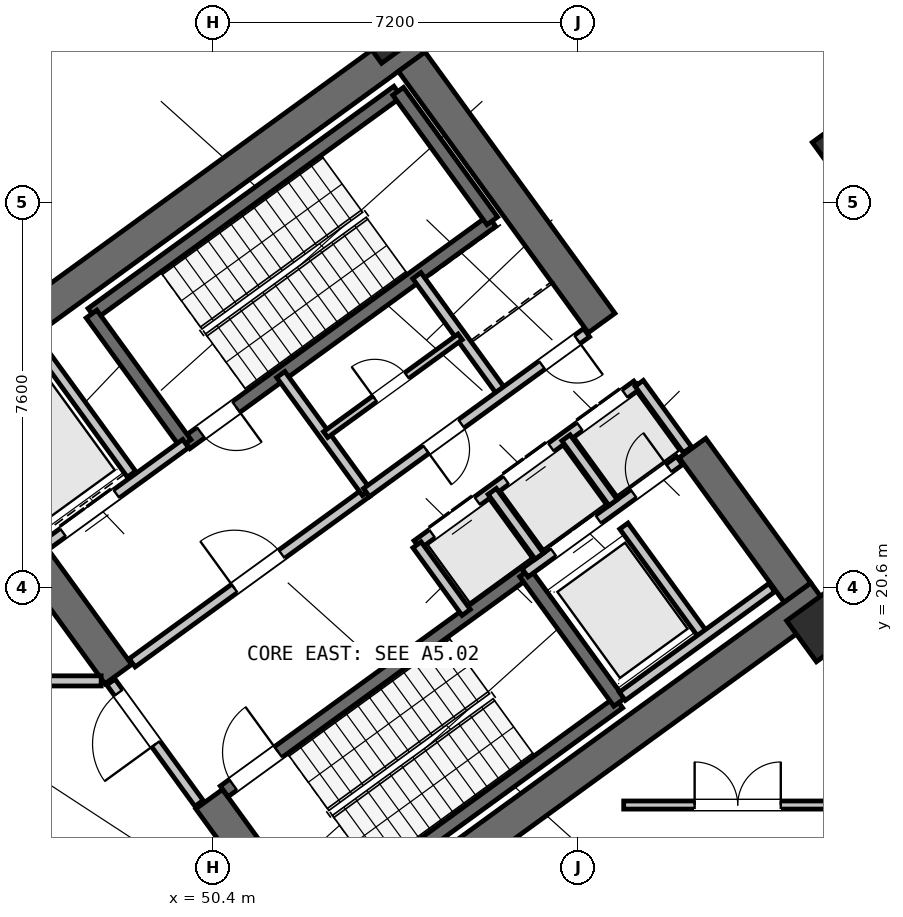
"""IFC4 building model, lengths in metres.
Left out: names, types, materials, properties, quantities, classifications, styles, units other than length and angle.
Written with IfcOpenShell. Run it as: python <this file> out.ifc"""

import sys

from ifc_helpers import new_model, si_unit, direction, frame, frame_2d, origin, origin_2d, place, context, subcontext, project, spatial, rectangle, hollow_rectangle, extrude, source, transform, mapped, element, fill, save


model = new_model("IFC4")
c1 = context("Model", 3, precision=1e-05, world=origin(), true_north=direction((0.0, 1.0)))
c2 = subcontext(c1, "Body", "Model", "MODEL_VIEW")
j1 = project(units=[si_unit("LENGTHUNIT", "METRE"), si_unit("PLANEANGLEUNIT", "RADIAN")], contexts=[c1])
p1 = place(None, origin())
s1 = spatial("IfcSite", under=j1, at=p1, CompositionType="ELEMENT")
p2 = place(p1, origin())
s2 = spatial("IfcBuilding", under=s1, at=p2, CompositionType="ELEMENT")
p3 = place(p2, origin())
s3 = spatial("IfcBuildingStorey", under=s2, at=p3, CompositionType="ELEMENT", Elevation=0.0)
p4 = place(p3, frame((52.318, 13.11, 0.0), z_axis=(0.0, 0.0, 1.0), x_axis=(0.809019445368, 0.587781878776, 0.0)))
e1 = element("IfcWall", 1, at=p4, inside=s3, PredefinedType="SHEAR", context=c2, shape_type="SweptSolid", body=[
    extrude(rectangle(XDim=12.44, YDim=0.65, at=frame_2d((6.22, 0.0))), origin(), (0.0, 0.0, 1.0), 5.05),
])
p5 = place(p3, frame((44.325, 24.113, 0.0), z_axis=(0.0, 0.0, 1.0), x_axis=(0.809012664862, 0.58779121131, 0.0)))
e2 = element("IfcWall", 2, at=p5, inside=s3, PredefinedType="SHEAR", context=c2, shape_type="SweptSolid", body=[
    extrude(rectangle(XDim=12.44, YDim=0.65, at=frame_2d((6.22, 0.0))), origin(), (0.0, 0.0, 1.0), 5.05),
])
p6 = place(p3, frame((52.39, 13.564, 0.0), z_axis=(0.0, 0.0, 1.0), x_axis=(-0.58779688989, 0.809008539037, 0.0)))
e3 = element("IfcWall", 3, at=p6, inside=s3, PredefinedType="SHEAR", context=c2, shape_type="SweptSolid", body=[
    extrude(rectangle(XDim=3.525, YDim=0.65, at=frame_2d((1.763, 0.0))), origin(), (0.0, 0.0, 1.0), 5.05),
])
p7 = place(p3, frame((48.526, 18.884, 0.0), z_axis=(0.0, 0.0, 1.0), x_axis=(-0.58777996584, 0.809020835181, 0.0)))
e4 = element("IfcWall", 4, at=p7, inside=s3, PredefinedType="SHEAR", context=c2, shape_type="SweptSolid", body=[
    extrude(rectangle(XDim=6.375, YDim=0.65, at=frame_2d((3.188, 0.0))), origin(), (0.0, 0.0, 1.0), 5.05),
])
p8 = place(p3, frame((61.929, 20.494, 0.0), z_axis=(0.0, 0.0, 1.0), x_axis=(-0.58782982593, 0.808984607855, 0.0)))
e5 = element("IfcWall", 5, at=p8, inside=s3, PredefinedType="SHEAR", context=c2, shape_type="SweptSolid", body=[
    extrude(rectangle(XDim=3.525, YDim=0.65, at=frame_2d((1.762, 0.0))), origin(), (0.0, 0.0, 1.0), 5.05),
])
p9 = place(p3, frame((58.064, 25.813, 0.0), z_axis=(0.0, 0.0, 1.0), x_axis=(-0.58777996584, 0.809020835181, 0.0)))
e6 = element("IfcWall", 6, at=p9, inside=s3, PredefinedType="SHEAR", context=c2, shape_type="SweptSolid", body=[
    extrude(rectangle(XDim=6.375, YDim=0.65, at=frame_2d((3.188, 0.0))), origin(), (0.0, 0.0, 1.0), 5.05),
])
m1 = source(origin(), c2, "Body", "SweptSolid", [
    extrude(hollow_rectangle(XDim=1.08, YDim=1.08, WallThickness=0.04, at=origin_2d()), origin(), (0.0, 0.0, 1.0), 5.4),
])
p10 = place(p3, frame((62.977, 29.259, 0.0), z_axis=(0.0, 0.0, 1.0), x_axis=(0.809016994375, 0.587785252292, 0.0)))
e7 = element("IfcColumn", 7, at=p10, inside=s3, PredefinedType="COLUMN", context=c2, shape_type="MappedRepresentation", body=[
    mapped(m1, transform((0.0, 0.0, 0.0), scale=1.0)),
])
m2 = source(origin(), c2, "Body", "SweptSolid", [
    extrude(hollow_rectangle(XDim=1.0, YDim=1.0, WallThickness=0.04, at=origin_2d()), origin(), (0.0, 0.0, 1.0), 5.4),
])
for number, where, z_axis, x_axis in (
    (8, (62.414, 19.827, 0.0), (0.0, 0.0, 1.0), (0.809, 0.588, 0.0)),
    (9, (53.832, 31.638, 0.0), (0.0, 0.0, 1.0), (0.809, 0.588, 0.0)),
):
    element("IfcColumn", number, at=place(p3, frame(where, z_axis=z_axis, x_axis=x_axis)), inside=s3, PredefinedType="COLUMN", context=c2, shape_type="MappedRepresentation", body=[
        mapped(m2, transform((0.0, 0.0, 0.0), scale=1.0)),
    ])
p11 = place(p3, frame((48.006, 25.996, 0.0), z_axis=(0.0, 0.0, 1.0), x_axis=(0.80901903764, 0.587782439969, 0.0)))
e10 = element("IfcWall", 10, at=p11, inside=s3, PredefinedType="SHEAR", context=c2, shape_type="SweptSolid", body=[
    extrude(rectangle(XDim=7.46, YDim=0.26, at=frame_2d((3.73, 0.0))), origin(), (0.0, 0.0, 1.0), 5.05),
])
p12 = place(p3, frame((49.863, 23.44, 0.0), z_axis=(0.0, 0.0, 1.0), x_axis=(0.809003474932, 0.587803859759, 0.0)))
e11 = element("IfcWall", 11, at=p12, inside=s3, PredefinedType="SHEAR", context=c2, shape_type="SweptSolid", body=[
    extrude(rectangle(XDim=7.46, YDim=0.26, at=frame_2d((3.73, 0.0))), origin(), (0.0, 0.0, 1.0), 5.05),
])
p13 = place(p12, frame((0.36, 0.0, 0.0)))
e12 = element("IfcOpeningElement", 12, at=p13, cuts=e11, PredefinedType="OPENING", context=c2, shape_type="SweptSolid", body=[
    extrude(rectangle(XDim=0.86, YDim=2.05, at=frame_2d((0.43, 1.025))), frame((0.0, 0.14, 0.0), z_axis=(0.0, -1.0, 0.0), x_axis=(1.0, 0.0, 0.0)), (0.0, 0.0, 1.0), 0.28),
])
p14 = place(p3, frame((49.855, 23.434, 0.0), z_axis=(0.0, 0.0, 1.0), x_axis=(-0.58776738483, 0.809029975545, 0.0)))
e13 = element("IfcWall", 13, at=p14, inside=s3, PredefinedType="SHEAR", context=c2, shape_type="SweptSolid", body=[
    extrude(rectangle(XDim=3.16, YDim=0.26, at=frame_2d((1.58, 0.0))), origin(), (0.0, 0.0, 1.0), 5.05),
])
p15 = place(p3, frame((55.906, 27.831, 0.0), z_axis=(0.0, 0.0, 1.0), x_axis=(-0.587804123638, 0.809003283204, 0.0)))
e14 = element("IfcWall", 14, at=p15, inside=s3, PredefinedType="SHEAR", context=c2, shape_type="SweptSolid", body=[
    extrude(rectangle(XDim=3.16, YDim=0.26, at=frame_2d((1.58, 0.0))), origin(), (0.0, 0.0, 1.0), 5.05),
])
p16 = place(p3, frame((52.472, 14.013, 0.0), z_axis=(0.0, 0.0, 1.0), x_axis=(0.809028366311, 0.587769599847, 0.0)))
e15 = element("IfcWall", 15, at=p16, inside=s3, PredefinedType="SHEAR", context=c2, shape_type="SweptSolid", body=[
    extrude(rectangle(XDim=7.33, YDim=0.26, at=frame_2d((3.665, 0.0))), origin(), (0.0, 0.0, 1.0), 5.05),
])
p17 = place(p3, frame((50.615, 16.57, 0.0), z_axis=(0.0, 0.0, 1.0), x_axis=(0.809028366311, 0.587769599847, 0.0)))
e16 = element("IfcWall", 16, at=p17, inside=s3, PredefinedType="SHEAR", context=c2, shape_type="SweptSolid", body=[
    extrude(rectangle(XDim=7.33, YDim=0.26, at=frame_2d((3.665, 0.0))), origin(), (0.0, 0.0, 1.0), 5.05),
])
p18 = place(p17, frame((0.22, 0.0, 0.0)))
e17 = element("IfcOpeningElement", 17, at=p18, cuts=e16, PredefinedType="OPENING", context=c2, shape_type="SweptSolid", body=[
    extrude(rectangle(XDim=1.1, YDim=2.1, at=frame_2d((0.55, 1.05))), frame((0.0, 0.14, 0.0), z_axis=(0.0, -1.0, 0.0), x_axis=(1.0, 0.0, 0.0)), (0.0, 0.0, 1.0), 0.28),
])
p19 = place(p3, frame((58.41, 18.327, 0.0), z_axis=(0.0, 0.0, 1.0), x_axis=(-0.58776738483, 0.809029975545, 0.0)))
e18 = element("IfcWall", 18, at=p19, inside=s3, PredefinedType="SHEAR", context=c2, shape_type="SweptSolid", body=[
    extrude(rectangle(XDim=3.16, YDim=0.26, at=frame_2d((1.58, 0.0))), origin(), (0.0, 0.0, 1.0), 5.05),
])
p20 = place(p3, frame((47.106, 21.437, 0.0), z_axis=(0.0, 0.0, 1.0), x_axis=(0.809012514015, 0.58779141893, 0.0)))
e19 = element("IfcWall", 19, at=p20, inside=s3, PredefinedType="STANDARD", context=c2, shape_type="SweptSolid", body=[
    extrude(rectangle(XDim=3.398, YDim=0.2, at=frame_2d((1.699, 0.0))), origin(), (0.0, 0.0, 1.0), 5.04),
])
p21 = place(p20, frame((0.408, 0.0, 0.0)))
e20 = element("IfcOpeningElement", 20, at=p21, cuts=e19, PredefinedType="OPENING", context=c2, shape_type="SweptSolid", body=[
    extrude(rectangle(XDim=1.3, YDim=2.2, at=frame_2d((0.65, 1.1))), frame((0.0, 0.11, 0.0), z_axis=(0.0, -1.0, 0.0), x_axis=(1.0, 0.0, 0.0)), (0.0, 0.0, 1.0), 0.22),
])
p22 = place(p3, frame((48.799, 19.107, 0.0), z_axis=(0.0, 0.0, 1.0), x_axis=(0.809012959416, 0.587790805897, 0.0)))
e21 = element("IfcWall", 21, at=p22, inside=s3, PredefinedType="STANDARD", context=c2, shape_type="SweptSolid", body=[
    extrude(rectangle(XDim=5.718, YDim=0.2, at=frame_2d((2.859, 0.0))), origin(), (0.0, 0.0, 1.0), 5.04),
])
p23 = place(p22, frame((2.498, 0.0, 0.0)))
e22 = element("IfcOpeningElement", 22, at=p23, cuts=e21, PredefinedType="OPENING", context=c2, shape_type="SweptSolid", body=[
    extrude(rectangle(XDim=1.15, YDim=2.1, at=frame_2d((0.575, 1.05))), frame((0.0, 0.11, 0.0), z_axis=(0.0, -1.0, 0.0), x_axis=(1.0, 0.0, 0.0)), (0.0, 0.0, 1.0), 0.22),
])
p24 = place(p3, frame((56.553, 20.884, 0.0), z_axis=(0.0, 0.0, 1.0), x_axis=(0.809035789462, 0.587759382205, 0.0)))
e23 = element("IfcWall", 23, at=p24, inside=s3, PredefinedType="STANDARD", context=c2, shape_type="SweptSolid", body=[
    extrude(rectangle(XDim=3.768, YDim=0.2, at=frame_2d((1.884, 0.0))), origin(), (0.0, 0.0, 1.0), 5.04),
])
p25 = place(p24, frame((0.69, 0.0, 0.0)))
e24 = element("IfcOpeningElement", 24, at=p25, cuts=e23, PredefinedType="OPENING", context=c2, shape_type="SweptSolid", body=[
    extrude(rectangle(XDim=1.1, YDim=2.15, at=frame_2d((0.55, 1.075))), frame((0.0, 0.11, 0.0), z_axis=(0.0, -1.0, 0.0), x_axis=(1.0, 0.0, 0.0)), (0.0, 0.0, 1.0), 0.22),
])
p26 = place(p24, frame((2.65, 0.0, 0.0)))
e25 = element("IfcOpeningElement", 25, at=p26, cuts=e23, PredefinedType="OPENING", context=c2, shape_type="SweptSolid", body=[
    extrude(rectangle(XDim=0.86, YDim=2.05, at=frame_2d((0.43, 1.025))), frame((0.0, 0.11, 0.0), z_axis=(0.0, -1.0, 0.0), x_axis=(1.0, 0.0, 0.0)), (0.0, 0.0, 1.0), 0.22),
])
p27 = place(p3, frame((54.421, 21.436, 0.0), z_axis=(0.0, 0.0, 1.0), x_axis=(0.809013710463, 0.587789772183, 0.0)))
e26 = element("IfcWall", 26, at=p27, inside=s3, PredefinedType="STANDARD", context=c2, shape_type="SweptSolid", body=[
    extrude(rectangle(XDim=5.36, YDim=0.2, at=frame_2d((2.68, 0.0))), origin(), (0.0, 0.0, 1.0), 5.04),
])
p28 = place(p27, frame((0.37, 0.0, 0.0)))
e27 = element("IfcOpeningElement", 27, at=p28, cuts=e26, PredefinedType="OPENING", context=c2, shape_type="SweptSolid", body=[
    extrude(rectangle(XDim=1.1, YDim=2.15, at=frame_2d((0.55, 1.075))), frame((0.0, 0.11, 0.0), z_axis=(0.0, -1.0, 0.0), x_axis=(1.0, 0.0, 0.0)), (0.0, 0.0, 1.0), 0.22),
])
p29 = place(p27, frame((2.17, 0.0, 0.0)))
e28 = element("IfcOpeningElement", 28, at=p29, cuts=e26, PredefinedType="OPENING", context=c2, shape_type="SweptSolid", body=[
    extrude(rectangle(XDim=1.1, YDim=2.15, at=frame_2d((0.55, 1.075))), frame((0.0, 0.11, 0.0), z_axis=(0.0, -1.0, 0.0), x_axis=(1.0, 0.0, 0.0)), (0.0, 0.0, 1.0), 0.22),
])
p30 = place(p27, frame((3.97, 0.0, 0.0)))
e29 = element("IfcOpeningElement", 29, at=p30, cuts=e26, PredefinedType="OPENING", context=c2, shape_type="SweptSolid", body=[
    extrude(rectangle(XDim=1.1, YDim=2.15, at=frame_2d((0.55, 1.075))), frame((0.0, 0.11, 0.0), z_axis=(0.0, -1.0, 0.0), x_axis=(1.0, 0.0, 0.0)), (0.0, 0.0, 1.0), 0.22),
])
p31 = place(p3, frame((55.391, 20.102, 0.0), z_axis=(0.0, 0.0, 1.0), x_axis=(-0.58778447739, 0.809017557374, 0.0)))
e30 = element("IfcWall", 30, at=p31, inside=s3, PredefinedType="STANDARD", context=c2, shape_type="SweptSolid", body=[
    extrude(rectangle(XDim=1.65, YDim=0.2, at=frame_2d((0.825, 0.0))), origin(), (0.0, 0.0, 1.0), 5.04),
])
p32 = place(p3, frame((48.786, 22.83, 0.0), z_axis=(0.0, 0.0, 1.0), x_axis=(-0.587783856777, 0.809018008275, 0.0)))
e31 = element("IfcWall", 31, at=p32, inside=s3, PredefinedType="STANDARD", context=c2, shape_type="SweptSolid", body=[
    extrude(rectangle(XDim=2.92, YDim=0.2, at=frame_2d((1.46, 0.0))), origin(), (0.0, 0.0, 1.0), 5.04),
])
p33 = place(p3, frame((56.834, 21.212, 0.0), z_axis=(0.0, 0.0, 1.0), x_axis=(-0.58776738483, 0.809029975545, 0.0)))
e32 = element("IfcWall", 32, at=p33, inside=s3, PredefinedType="STANDARD", context=c2, shape_type="SweptSolid", body=[
    extrude(rectangle(XDim=1.58, YDim=0.2, at=frame_2d((0.79, 0.0))), origin(), (0.0, 0.0, 1.0), 5.04),
])
p34 = place(p3, frame((58.29, 22.27, 0.0), z_axis=(0.0, 0.0, 1.0), x_axis=(-0.587840865826, 0.808976585857, 0.0)))
e33 = element("IfcWall", 33, at=p34, inside=s3, PredefinedType="STANDARD", context=c2, shape_type="SweptSolid", body=[
    extrude(rectangle(XDim=1.58, YDim=0.2, at=frame_2d((0.79, 0.0))), origin(), (0.0, 0.0, 1.0), 5.04),
])
p35 = place(p3, frame((59.758, 23.312, 0.0), z_axis=(0.0, 0.0, 1.0), x_axis=(-0.587875962906, 0.808951081486, 0.0)))
e34 = element("IfcWall", 34, at=p35, inside=s3, PredefinedType="STANDARD", context=c2, shape_type="SweptSolid", body=[
    extrude(rectangle(XDim=1.62, YDim=0.2, at=frame_2d((0.81, 0.0))), origin(), (0.0, 0.0, 1.0), 5.04),
])
p36 = place(p3, frame((60.067, 19.655, 0.0), z_axis=(0.0, 0.0, 1.0), x_axis=(-0.587800520745, 0.809005900975, 0.0)))
e35 = element("IfcWall", 35, at=p36, inside=s3, PredefinedType="STANDARD", context=c2, shape_type="SweptSolid", body=[
    extrude(rectangle(XDim=2.66, YDim=0.2, at=frame_2d((1.33, 0.0))), origin(), (0.0, 0.0, 1.0), 5.04),
])
p37 = place(p3, frame((58.472, 18.447, 0.0), z_axis=(0.0, 0.0, 1.0), x_axis=(0.809022487728, 0.587777691266, 0.0)))
e36 = element("IfcWall", 36, at=p37, inside=s3, PredefinedType="STANDARD", context=c2, shape_type="SweptSolid", body=[
    extrude(rectangle(XDim=3.648, YDim=0.2, at=frame_2d((1.824, 0.0))), origin(), (0.0, 0.0, 1.0), 5.04),
])
p38 = place(p3, frame((53.425, 22.468, 0.0), z_axis=(0.0, 0.0, 1.0), x_axis=(-0.5877230039, 0.809062216821, 0.0)))
e37 = element("IfcWall", 37, at=p38, inside=s3, PredefinedType="STANDARD", context=c2, shape_type="SweptSolid", body=[
    extrude(rectangle(XDim=2.88, YDim=0.2, at=frame_2d((1.44, 0.0))), origin(), (0.0, 0.0, 1.0), 5.04),
])
p39 = place(p3, frame((56.111, 24.419, 0.0), z_axis=(0.0, 0.0, 1.0), x_axis=(-0.58777848983, 0.809021907548, 0.0)))
e38 = element("IfcWall", 38, at=p39, inside=s3, PredefinedType="STANDARD", context=c2, shape_type="SweptSolid", body=[
    extrude(rectangle(XDim=2.88, YDim=0.2, at=frame_2d((1.44, 0.0))), origin(), (0.0, 0.0, 1.0), 5.04),
])
p40 = place(p3, frame((53.425, 22.468, 0.0), z_axis=(0.0, 0.0, 1.0), x_axis=(0.80902705128, 0.587771409902, 0.0)))
e39 = element("IfcWall", 39, at=p40, inside=s3, PredefinedType="STANDARD", context=c2, shape_type="SweptSolid", body=[
    extrude(rectangle(XDim=5.368, YDim=0.2, at=frame_2d((2.684, 0.0))), origin(), (0.0, 0.0, 1.0), 5.04),
])
p41 = place(p40, frame((4.28, 0.0, 0.0)))
e40 = element("IfcOpeningElement", 40, at=p41, cuts=e39, PredefinedType="OPENING", context=c2, shape_type="SweptSolid", body=[
    extrude(rectangle(XDim=0.86, YDim=2.05, at=frame_2d((0.43, 1.025))), frame((0.0, 0.11, 0.0), z_axis=(0.0, -1.0, 0.0), x_axis=(1.0, 0.0, 0.0)), (0.0, 0.0, 1.0), 0.22),
])
p42 = place(p40, frame((1.45, 0.0, 0.0)))
e41 = element("IfcOpeningElement", 41, at=p42, cuts=e39, PredefinedType="OPENING", context=c2, shape_type="SweptSolid", body=[
    extrude(rectangle(XDim=0.86, YDim=2.05, at=frame_2d((0.43, 1.025))), frame((0.0, 0.11, 0.0), z_axis=(0.0, -1.0, 0.0), x_axis=(1.0, 0.0, 0.0)), (0.0, 0.0, 1.0), 0.22),
])
p43 = place(p3, frame((52.618, 23.612, 0.0), z_axis=(0.0, 0.0, 1.0), x_axis=(0.809009587469, 0.587795446889, 0.0)))
e42 = element("IfcWall", 42, at=p43, inside=s3, PredefinedType="PLUMBINGWALL", context=c2, shape_type="SweptSolid", body=[
    extrude(rectangle(XDim=3.28, YDim=0.14, at=frame_2d((1.64, 0.0))), origin(), (0.0, 0.0, 1.0), 5.04),
])
p44 = place(p43, frame((1.2, 0.0, 0.0)))
e43 = element("IfcOpeningElement", 43, at=p44, cuts=e42, PredefinedType="OPENING", context=c2, shape_type="SweptSolid", body=[
    extrude(rectangle(XDim=0.78, YDim=2.05, at=frame_2d((0.39, 1.025))), frame((0.0, 0.08, 0.0), z_axis=(0.0, -1.0, 0.0), x_axis=(1.0, 0.0, 0.0)), (0.0, 0.0, 1.0), 0.16),
])
p45 = place(p3, frame((46.85, 18.75, 0.0), z_axis=(0.0, 0.0, 1.0), x_axis=(1.0, 0.0, 0.0)))
e44 = element("IfcWall", 44, at=p45, inside=s3, PredefinedType="STANDARD", context=c2, shape_type="SweptSolid", body=[
    extrude(rectangle(XDim=1.338, YDim=0.2, at=frame_2d((0.669, 0.0))), origin(), (0.0, 0.0, 1.0), 5.04),
])
p46 = place(p3, frame((50.119, 16.333, 0.0), z_axis=(0.0, 0.0, 1.0), x_axis=(-0.587749856981, 0.809042709391, 0.0)))
e45 = element("IfcWall", 45, at=p46, inside=s3, PredefinedType="STANDARD", context=c2, shape_type="SweptSolid", body=[
    extrude(rectangle(XDim=2.96, YDim=0.2, at=frame_2d((1.48, 0.0))), origin(), (0.0, 0.0, 1.0), 5.04),
])
p47 = place(p46, frame((1.45, 0.0, 0.0)))
e46 = element("IfcOpeningElement", 46, at=p47, cuts=e45, PredefinedType="OPENING", context=c2, shape_type="SweptSolid", body=[
    extrude(rectangle(XDim=1.25, YDim=2.15, at=frame_2d((0.625, 1.075))), frame((0.0, 0.11, 0.0), z_axis=(0.0, -1.0, 0.0), x_axis=(1.0, 0.0, 0.0)), (0.0, 0.0, 1.0), 0.22),
])
p48 = place(p3, frame((58.5, 16.3, 0.0), z_axis=(0.0, 0.0, 1.0), x_axis=(1.0, 0.0, 0.0)))
e47 = element("IfcWall", 47, at=p48, inside=s3, PredefinedType="PARTITIONING", context=c2, shape_type="SweptSolid", body=[
    extrude(rectangle(XDim=11.9, YDim=0.16, at=frame_2d((5.95, 0.0))), origin(), (0.0, 0.0, 1.0), 5.04),
])
p49 = place(p48, frame((1.4, 0.0, 0.0)))
e48 = element("IfcOpeningElement", 48, at=p49, cuts=e47, PredefinedType="OPENING", context=c2, shape_type="SweptSolid", body=[
    extrude(rectangle(XDim=1.7, YDim=2.2, at=frame_2d((0.85, 1.1))), frame((0.0, 0.09, 0.0), z_axis=(0.0, -1.0, 0.0), x_axis=(1.0, 0.0, 0.0)), (0.0, 0.0, 1.0), 0.18),
])
m3 = source(origin(), c2, "Body", "SweptSolid", [
    extrude(rectangle(XDim=0.86, YDim=2.05, at=frame_2d((0.43, 1.025))), frame((0.0, 0.025, 0.0), z_axis=(0.0, -1.0, 0.0), x_axis=(1.0, 0.0, 0.0)), (0.0, 0.0, 1.0), 0.05),
])
p50 = place(p13, frame((0.86, 0.0, 0.0), z_axis=(0.0, 0.0, 1.0), x_axis=(-1.0, 0.0, 0.0)))
e49 = element("IfcDoor", 49, at=p50, inside=s3, OperationType="SINGLE_SWING_LEFT", PredefinedType="DOOR", context=c2, shape_type="MappedRepresentation", body=[
    mapped(m3, transform((0.0, 0.0, 0.0), scale=1.0)),
])
fill(e12, e49)
m4 = source(origin(), c2, "Body", "SweptSolid", [
    extrude(rectangle(XDim=1.1, YDim=2.1, at=frame_2d((0.55, 1.05))), frame((0.0, 0.025, 0.0), z_axis=(0.0, -1.0, 0.0), x_axis=(1.0, 0.0, 0.0)), (0.0, 0.0, 1.0), 0.05),
])
p51 = place(p18, origin())
e50 = element("IfcDoor", 50, at=p51, inside=s3, OperationType="SINGLE_SWING_RIGHT", PredefinedType="DOOR", context=c2, shape_type="MappedRepresentation", body=[
    mapped(m4, transform((0.0, 0.0, 0.0), scale=1.0)),
])
fill(e17, e50)
m5 = source(origin(), c2, "Body", "SweptSolid", [
    extrude(rectangle(XDim=1.15, YDim=2.1, at=frame_2d((0.575, 1.05))), frame((0.0, 0.025, 0.0), z_axis=(0.0, -1.0, 0.0), x_axis=(1.0, 0.0, 0.0)), (0.0, 0.0, 1.0), 0.05),
])
p52 = place(p23, origin())
e51 = element("IfcDoor", 51, at=p52, inside=s3, OperationType="SINGLE_SWING_LEFT", PredefinedType="DOOR", context=c2, shape_type="MappedRepresentation", body=[
    mapped(m5, transform((0.0, 0.0, 0.0), scale=1.0)),
])
fill(e22, e51)
m6 = source(origin(), c2, "Body", "SweptSolid", [
    extrude(rectangle(XDim=1.3, YDim=2.2, at=frame_2d((0.65, 1.1))), frame((0.0, 0.025, 0.0), z_axis=(0.0, -1.0, 0.0), x_axis=(1.0, 0.0, 0.0)), (0.0, 0.0, 1.0), 0.05),
])
p53 = place(p21, origin())
e52 = element("IfcDoor", 52, at=p53, inside=s3, OperationType="DOUBLE_DOOR_SLIDING", PredefinedType="DOOR", context=c2, shape_type="MappedRepresentation", body=[
    mapped(m6, transform((0.0, 0.0, 0.0), scale=1.0)),
])
fill(e20, e52)
m7 = source(origin(), c2, "Body", "SweptSolid", [
    extrude(rectangle(XDim=1.1, YDim=2.15, at=frame_2d((0.55, 1.075))), frame((0.0, 0.025, 0.0), z_axis=(0.0, -1.0, 0.0), x_axis=(1.0, 0.0, 0.0)), (0.0, 0.0, 1.0), 0.05),
])
p54 = place(p28, origin())
e53 = element("IfcDoor", 53, at=p54, inside=s3, OperationType="DOUBLE_DOOR_SLIDING", PredefinedType="DOOR", context=c2, shape_type="MappedRepresentation", body=[
    mapped(m7, transform((0.0, 0.0, 0.0), scale=1.0)),
])
fill(e27, e53)
p55 = place(p29, origin())
e54 = element("IfcDoor", 54, at=p55, inside=s3, OperationType="DOUBLE_DOOR_SLIDING", PredefinedType="DOOR", context=c2, shape_type="MappedRepresentation", body=[
    mapped(m7, transform((0.0, 0.0, 0.0), scale=1.0)),
])
fill(e28, e54)
p56 = place(p30, origin())
e55 = element("IfcDoor", 55, at=p56, inside=s3, OperationType="DOUBLE_DOOR_SLIDING", PredefinedType="DOOR", context=c2, shape_type="MappedRepresentation", body=[
    mapped(m7, transform((0.0, 0.0, 0.0), scale=1.0)),
])
fill(e29, e55)
p57 = place(p25, origin())
e56 = element("IfcDoor", 56, at=p57, inside=s3, OperationType="DOUBLE_DOOR_SLIDING", PredefinedType="DOOR", context=c2, shape_type="MappedRepresentation", body=[
    mapped(m7, transform((0.0, 0.0, 0.0), scale=1.0)),
])
fill(e24, e56)
p58 = place(p26, origin())
e57 = element("IfcDoor", 57, at=p58, inside=s3, OperationType="SINGLE_SWING_RIGHT", PredefinedType="DOOR", context=c2, shape_type="MappedRepresentation", body=[
    mapped(m3, transform((0.0, 0.0, 0.0), scale=1.0)),
])
fill(e25, e57)
p59 = place(p41, frame((0.86, 0.0, 0.0), z_axis=(0.0, 0.0, 1.0), x_axis=(-1.0, 0.0, 0.0)))
e58 = element("IfcDoor", 58, at=p59, inside=s3, OperationType="SINGLE_SWING_LEFT", PredefinedType="DOOR", context=c2, shape_type="MappedRepresentation", body=[
    mapped(m3, transform((0.0, 0.0, 0.0), scale=1.0)),
])
fill(e40, e58)
p60 = place(p42, frame((0.86, 0.0, 0.0), z_axis=(0.0, 0.0, 1.0), x_axis=(-1.0, 0.0, 0.0)))
e59 = element("IfcDoor", 59, at=p60, inside=s3, OperationType="SINGLE_SWING_RIGHT", PredefinedType="DOOR", context=c2, shape_type="MappedRepresentation", body=[
    mapped(m3, transform((0.0, 0.0, 0.0), scale=1.0)),
])
fill(e41, e59)
m8 = source(origin(), c2, "Body", "SweptSolid", [
    extrude(rectangle(XDim=0.78, YDim=2.05, at=frame_2d((0.39, 1.025))), frame((0.0, 0.025, 0.0), z_axis=(0.0, -1.0, 0.0), x_axis=(1.0, 0.0, 0.0)), (0.0, 0.0, 1.0), 0.05),
])
p61 = place(p44, origin())
e60 = element("IfcDoor", 60, at=p61, inside=s3, OperationType="SINGLE_SWING_LEFT", PredefinedType="DOOR", context=c2, shape_type="MappedRepresentation", body=[
    mapped(m8, transform((0.0, 0.0, 0.0), scale=1.0)),
])
fill(e43, e60)
m9 = source(origin(), c2, "Body", "SweptSolid", [
    extrude(rectangle(XDim=1.25, YDim=2.15, at=frame_2d((0.625, 1.075))), frame((0.0, 0.025, 0.0), z_axis=(0.0, -1.0, 0.0), x_axis=(1.0, 0.0, 0.0)), (0.0, 0.0, 1.0), 0.05),
])
p62 = place(p47, origin())
e61 = element("IfcDoor", 61, at=p62, inside=s3, OperationType="SINGLE_SWING_LEFT", PredefinedType="DOOR", context=c2, shape_type="MappedRepresentation", body=[
    mapped(m9, transform((0.0, 0.0, 0.0), scale=1.0)),
])
fill(e46, e61)
m10 = source(origin(), c2, "Body", "SweptSolid", [
    extrude(rectangle(XDim=1.7, YDim=2.2, at=frame_2d((0.85, 1.1))), frame((0.0, 0.025, 0.0), z_axis=(0.0, -1.0, 0.0), x_axis=(1.0, 0.0, 0.0)), (0.0, 0.0, 1.0), 0.05),
])
p63 = place(p49, origin())
e62 = element("IfcDoor", 62, at=p63, inside=s3, OperationType="DOUBLE_DOOR_SINGLE_SWING", PredefinedType="DOOR", context=c2, shape_type="MappedRepresentation", body=[
    mapped(m10, transform((0.0, 0.0, 0.0), scale=1.0)),
])
fill(e48, e62)
save(model, sys.argv[1])
